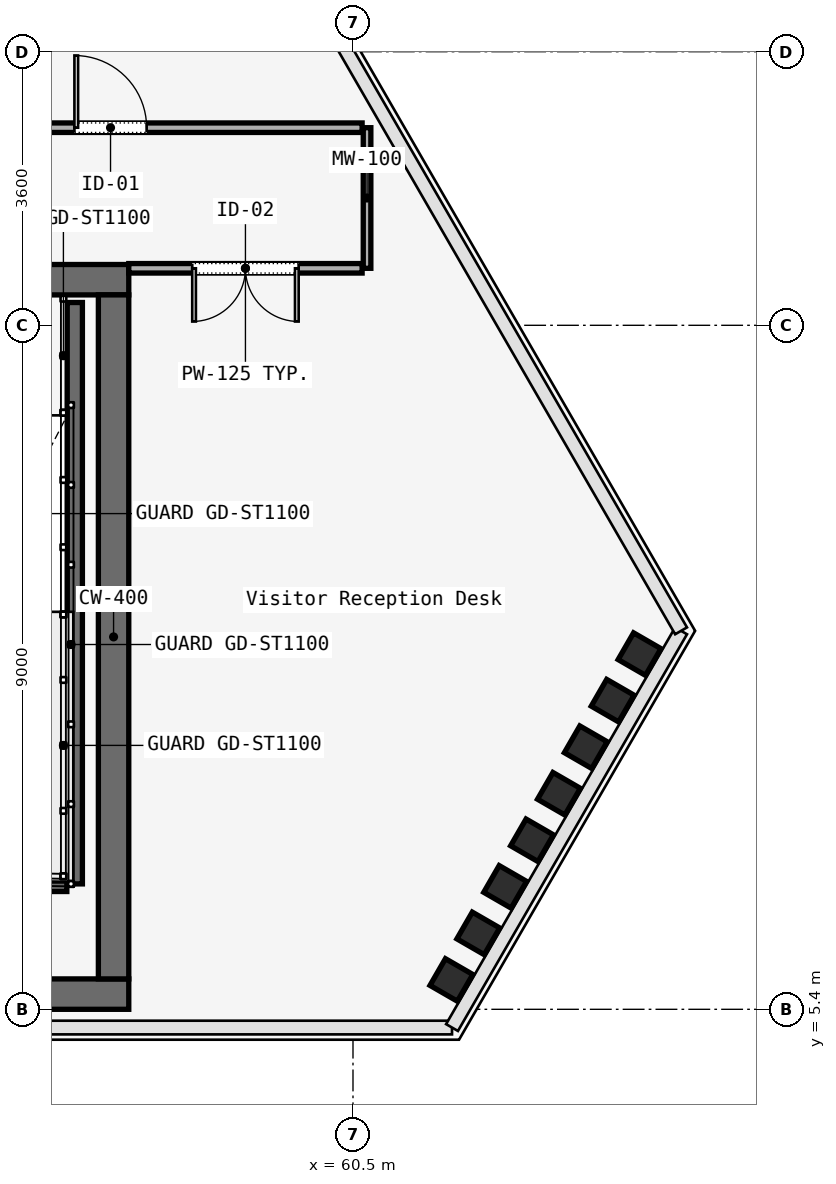
"""IFC4 building model, lengths in metres.
Left out: names, types, materials, properties, quantities, classifications, styles, units other than length and angle.
Written with IfcOpenShell. Run it as: python <this file> out.ifc"""

import sys

from ifc_helpers import new_model, si_unit, direction, frame, frame_2d, origin, origin_2d, place, context, subcontext, project, spatial, rectangle, i_section, extrude, element, fill, save


model = new_model("IFC4")
c1 = context("Model", 3, precision=1e-05, world=origin(), true_north=direction((0.0, 1.0)))
c2 = subcontext(c1, "Body", "Model", "MODEL_VIEW")
j1 = project(units=[si_unit("LENGTHUNIT", "METRE"), si_unit("PLANEANGLEUNIT", "RADIAN")], contexts=[c1])
p1 = place(None, origin())
s1 = spatial("IfcSite", under=j1, at=p1, CompositionType="ELEMENT")
p2 = place(p1, origin())
s2 = spatial("IfcBuilding", under=s1, at=p2, CompositionType="ELEMENT")
p3 = place(p2, frame((0.0, 0.0, 252.2)))
s3 = spatial("IfcBuildingStorey", under=s2, at=p3, CompositionType="ELEMENT", Elevation=252.2)
p4 = place(p3, frame((26.45, 15.0, 0.0), z_axis=(0.0, 0.0, 1.0), x_axis=(1.0, 0.0, 0.0)))
e1 = element("IfcWall", 1, at=p4, inside=s3, PredefinedType="SOLIDWALL", context=c2, shape_type="SweptSolid", body=[
    extrude(rectangle(XDim=31.1, YDim=0.4, at=frame_2d((15.55, 0.0))), origin(), (0.0, 0.0, 1.0), 3.58),
])
p5 = place(p4, frame((1.65, 0.0, 0.0)))
e2 = element("IfcOpeningElement", 2, at=p5, cuts=e1, PredefinedType="OPENING", context=c2, shape_type="SweptSolid", body=[
    extrude(rectangle(XDim=1.1, YDim=2.2, at=frame_2d((0.55, 1.1))), frame((0.0, 0.2, 0.0), z_axis=(0.0, -1.0, 0.0), x_axis=(1.0, 0.0, 0.0)), (0.0, 0.0, 1.0), 0.4),
])
p6 = place(p4, frame((13.65, 0.0, 0.0)))
e3 = element("IfcOpeningElement", 3, at=p6, cuts=e1, PredefinedType="OPENING", context=c2, shape_type="SweptSolid", body=[
    extrude(rectangle(XDim=1.1, YDim=2.2, at=frame_2d((0.55, 1.1))), frame((0.0, 0.2, 0.0), z_axis=(0.0, -1.0, 0.0), x_axis=(1.0, 0.0, 0.0)), (0.0, 0.0, 1.0), 0.4),
])
p7 = place(p4, frame((25.55, 0.0, 0.0)))
e4 = element("IfcOpeningElement", 4, at=p7, cuts=e1, PredefinedType="OPENING", context=c2, shape_type="SweptSolid", body=[
    extrude(rectangle(XDim=1.1, YDim=2.2, at=frame_2d((0.55, 1.1))), frame((0.0, 0.2, 0.0), z_axis=(0.0, -1.0, 0.0), x_axis=(1.0, 0.0, 0.0)), (0.0, 0.0, 1.0), 0.4),
])
p8 = place(p4, frame((19.35, 0.0, 0.0)))
e5 = element("IfcOpeningElement", 5, at=p8, cuts=e1, PredefinedType="OPENING", context=c2, shape_type="SweptSolid", body=[
    extrude(rectangle(XDim=1.1, YDim=2.2, at=frame_2d((0.55, 1.1))), frame((0.0, 0.2, 0.0), z_axis=(0.0, -1.0, 0.0), x_axis=(1.0, 0.0, 0.0)), (0.0, 0.0, 1.0), 0.4),
])
p9 = place(p4, frame((21.4, 0.0, 0.0)))
e6 = element("IfcOpeningElement", 6, at=p9, cuts=e1, PredefinedType="OPENING", context=c2, shape_type="SweptSolid", body=[
    extrude(rectangle(XDim=0.9, YDim=2.1, at=frame_2d((0.45, 1.05))), frame((0.0, 0.2, 0.0), z_axis=(0.0, -1.0, 0.0), x_axis=(1.0, 0.0, 0.0)), (0.0, 0.0, 1.0), 0.4),
])
p10 = place(p4, frame((6.54, 0.0, 0.0)))
e7 = element("IfcOpeningElement", 7, at=p10, cuts=e1, PredefinedType="OPENING", context=c2, shape_type="SweptSolid", body=[
    extrude(rectangle(XDim=0.95, YDim=2.2, at=frame_2d((0.475, 1.1))), frame((0.0, 0.2, 0.0), z_axis=(0.0, -1.0, 0.0), x_axis=(1.0, 0.0, 0.0)), (0.0, 0.0, 1.0), 0.4),
])
p11 = place(p4, frame((10.49, 0.0, 0.0)))
e8 = element("IfcOpeningElement", 8, at=p11, cuts=e1, PredefinedType="OPENING", context=c2, shape_type="SweptSolid", body=[
    extrude(rectangle(XDim=0.95, YDim=2.2, at=frame_2d((0.475, 1.1))), frame((0.0, 0.2, 0.0), z_axis=(0.0, -1.0, 0.0), x_axis=(1.0, 0.0, 0.0)), (0.0, 0.0, 1.0), 0.4),
])
p12 = place(p4, frame((23.35, 0.0, 0.0)))
e9 = element("IfcOpeningElement", 9, at=p12, cuts=e1, PredefinedType="OPENING", context=c2, shape_type="SweptSolid", body=[
    extrude(rectangle(XDim=1.3, YDim=2.3, at=frame_2d((0.65, 1.15))), frame((0.0, 0.2, 0.0), z_axis=(0.0, -1.0, 0.0), x_axis=(1.0, 0.0, 0.0)), (0.0, 0.0, 1.0), 0.4),
])
p13 = place(p3, frame((26.45, 5.6, 0.0), z_axis=(0.0, 0.0, 1.0), x_axis=(1.0, 0.0, 0.0)))
e10 = element("IfcWall", 10, at=p13, inside=s3, PredefinedType="SOLIDWALL", context=c2, shape_type="SweptSolid", body=[
    extrude(rectangle(XDim=31.1, YDim=0.4, at=frame_2d((15.55, 0.0))), origin(), (0.0, 0.0, 1.0), 3.58),
])
p14 = place(p3, frame((57.35, 5.8, 0.0), z_axis=(0.0, 0.0, 1.0), x_axis=(0.0, 1.0, 0.0)))
e11 = element("IfcWall", 11, at=p14, inside=s3, PredefinedType="SOLIDWALL", context=c2, shape_type="SweptSolid", body=[
    extrude(rectangle(XDim=9.0, YDim=0.4, at=frame_2d((4.5, 0.0))), origin(), (0.0, 0.0, 1.0), 3.58),
])
for number, where, z_axis, x_axis in (
    (12, (61.795, 5.786, 0.0), (0.0, 0.0, 1.0), (0.5, 0.866, 0.0)),
    (13, (62.149, 6.399, 0.0), (0.0, 0.0, 1.0), (0.5, 0.866, 0.0)),
    (14, (62.502, 7.011, 0.0), (0.0, 0.0, 1.0), (0.5, 0.866, 0.0)),
    (15, (62.856, 7.624, 0.0), (0.0, 0.0, 1.0), (0.5, 0.866, 0.0)),
    (16, (63.209, 8.236, 0.0), (0.0, 0.0, 1.0), (0.5, 0.866, 0.0)),
    (17, (63.563, 8.849, 0.0), (0.0, 0.0, 1.0), (0.5, 0.866, 0.0)),
    (18, (63.917, 9.461, 0.0), (0.0, 0.0, 1.0), (0.5, 0.866, 0.0)),
    (19, (64.27, 10.073, 0.0), (0.0, 0.0, 1.0), (0.5, 0.866, 0.0)),
):
    element("IfcColumn", number, at=place(p3, frame(where, z_axis=z_axis, x_axis=x_axis)), inside=s3, PredefinedType="COLUMN", context=c2, shape_type="SweptSolid", body=[
        extrude(i_section(OverallWidth=0.406, OverallDepth=0.416, WebThickness=0.03, FlangeThickness=0.037, FilletRadius=0.015, at=origin_2d()), origin(), (0.0, 0.0, 1.0), 3.58),
    ])
p15 = place(p3, frame((56.84, 14.7, 0.0), z_axis=(0.0, 0.0, 1.0), x_axis=(0.0, -1.0, 0.0)))
e20 = element("IfcWall", 20, at=p15, inside=s3, PredefinedType="SOLIDWALL", context=c2, shape_type="SweptSolid", body=[
    extrude(rectangle(XDim=7.65, YDim=0.2, at=frame_2d((3.825, 0.0))), origin(), (0.0, 0.0, 1.0), 3.8),
])
p16 = place(p3, frame((53.62, 7.05, 0.0), z_axis=(0.0, 0.0, 1.0), x_axis=(1.0, 0.0, 0.0)))
e21 = element("IfcWall", 21, at=p16, inside=s3, PredefinedType="SOLIDWALL", context=c2, shape_type="SweptSolid", body=[
    extrude(rectangle(XDim=3.115, YDim=0.2, at=frame_2d((1.558, 0.0))), origin(), (0.0, 0.0, 1.0), 3.8),
])
p17 = place(p3, frame((60.685, 17.0, 0.0), z_axis=(0.0, 0.0, 1.0), x_axis=(0.0, -1.0, 0.0)))
e22 = element("IfcWall", 22, at=p17, inside=s3, PredefinedType="MOVABLE", context=c2, shape_type="SweptSolid", body=[
    extrude(rectangle(XDim=1.85, YDim=0.1, at=frame_2d((0.925, 0.0))), origin(), (0.0, 0.0, 1.0), 3.01),
])
p18 = place(p3, frame((60.62, 15.15, 0.0), z_axis=(0.0, 0.0, 1.0), x_axis=(-1.0, 0.0, 0.0)))
e23 = element("IfcWall", 23, at=p18, inside=s3, PredefinedType="PARTITIONING", context=c2, shape_type="SweptSolid", body=[
    extrude(rectangle(XDim=3.07, YDim=0.125, at=frame_2d((1.535, 0.0))), origin(), (0.0, 0.0, 1.0), 3.01),
])
p19 = place(p18, frame((0.835, 0.0, 0.0)))
e24 = element("IfcOpeningElement", 24, at=p19, cuts=e23, PredefinedType="OPENING", context=c2, shape_type="SweptSolid", body=[
    extrude(rectangle(XDim=1.4, YDim=2.2, at=frame_2d((0.7, 1.1))), frame((0.0, 0.062, 0.0), z_axis=(0.0, -1.0, 0.0), x_axis=(1.0, 0.0, 0.0)), (0.0, 0.0, 1.0), 0.125),
])
p20 = place(p3, frame((54.0, 17.0, 0.0), z_axis=(0.0, 0.0, 1.0), x_axis=(1.0, 0.0, 0.0)))
e25 = element("IfcWall", 25, at=p20, inside=s3, PredefinedType="PARTITIONING", context=c2, shape_type="SweptSolid", body=[
    extrude(rectangle(XDim=6.62, YDim=0.125, at=frame_2d((3.31, 0.0))), origin(), (0.0, 0.0, 1.0), 3.01),
])
p21 = place(p20, frame((2.835, 0.0, 0.0)))
e26 = element("IfcOpeningElement", 26, at=p21, cuts=e25, PredefinedType="OPENING", context=c2, shape_type="SweptSolid", body=[
    extrude(rectangle(XDim=0.95, YDim=2.2, at=frame_2d((0.475, 1.1))), frame((0.0, 0.062, 0.0), z_axis=(0.0, -1.0, 0.0), x_axis=(1.0, 0.0, 0.0)), (0.0, 0.0, 1.0), 0.125),
])
p22 = place(p19, origin())
e27 = element("IfcDoor", 27, at=p22, inside=s3, OperationType="SINGLE_SWING_LEFT", PredefinedType="DOOR", context=c2, shape_type="SweptSolid", body=[
    extrude(rectangle(XDim=1.4, YDim=2.2, at=frame_2d((0.7, 1.1))), frame((0.0, 0.025, 0.0), z_axis=(0.0, -1.0, 0.0), x_axis=(1.0, 0.0, 0.0)), (0.0, 0.0, 1.0), 0.05),
])
fill(e24, e27)
p23 = place(p21, origin())
e28 = element("IfcDoor", 28, at=p23, inside=s3, OperationType="SINGLE_SWING_LEFT", PredefinedType="DOOR", context=c2, shape_type="SweptSolid", body=[
    extrude(rectangle(XDim=0.95, YDim=2.2, at=frame_2d((0.475, 1.1))), frame((0.0, 0.025, 0.0), z_axis=(0.0, -1.0, 0.0), x_axis=(1.0, 0.0, 0.0)), (0.0, 0.0, 1.0), 0.05),
])
fill(e26, e28)
save(model, sys.argv[1])
